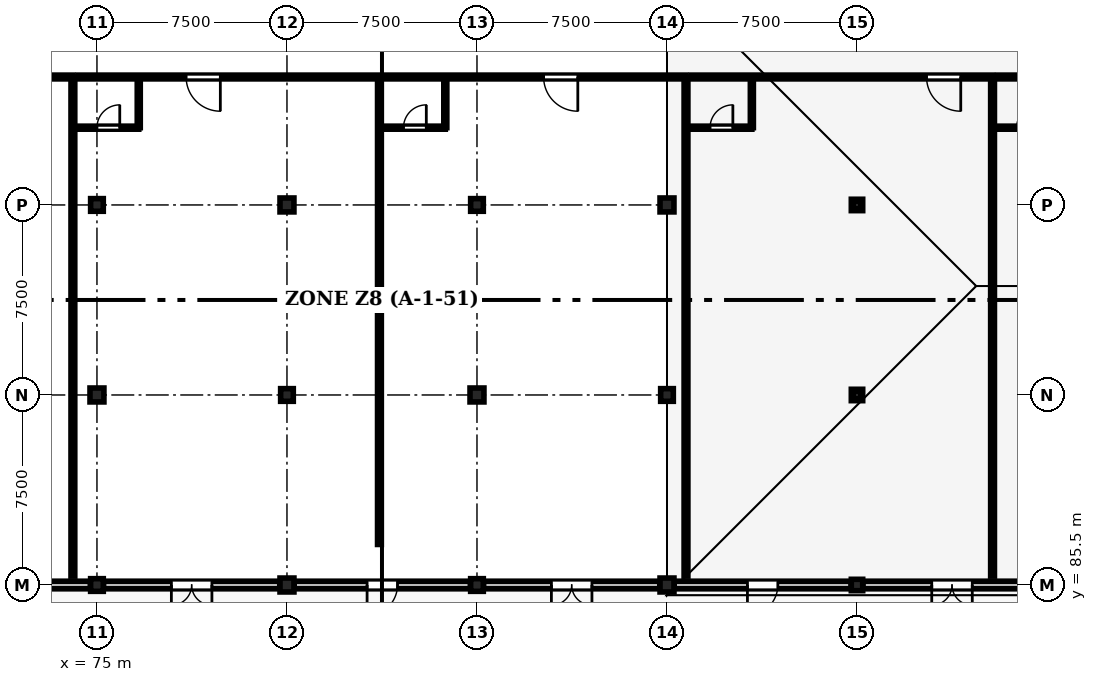
"""IFC4 building model, lengths in metres.
Left out: names, types, materials, properties, quantities, classifications, styles, units other than length and angle.
Written with IfcOpenShell. Run it as: python <this file> out.ifc"""

import sys

from ifc_helpers import new_model, si_unit, direction, frame, frame_2d, origin, origin_2d, place, context, subcontext, project, spatial, rectangle, i_section, extrude, element, fill, save


model = new_model("IFC4")
c1 = context("Model", 3, precision=1e-05, world=origin(), true_north=direction((0.0, 1.0)))
c2 = subcontext(c1, "Body", "Model", "MODEL_VIEW")
j1 = project(units=[si_unit("LENGTHUNIT", "METRE"), si_unit("PLANEANGLEUNIT", "RADIAN")], contexts=[c1])
p1 = place(None, origin())
s1 = spatial("IfcSite", under=j1, at=p1, CompositionType="ELEMENT")
p2 = place(p1, origin())
s2 = spatial("IfcBuilding", under=s1, at=p2, CompositionType="ELEMENT")
p3 = place(p2, frame((0.0, 0.0, 17.85)))
s3 = spatial("IfcBuildingStorey", under=s2, at=p3, CompositionType="ELEMENT", Elevation=17.85)
p4 = place(p3, frame((75.0, 85.5, 0.0), z_axis=(0.0, 0.0, 1.0), x_axis=(1.0, 0.0, 0.0)))
e1 = element("IfcColumn", 1, at=p4, inside=s3, PredefinedType="COLUMN", context=c2, shape_type="SweptSolid", body=[
    extrude(rectangle(XDim=0.5, YDim=0.5, at=origin_2d()), origin(), (0.0, 0.0, 1.0), 4.05),
])
p5 = place(p3, frame((75.0, 93.0, 0.0), z_axis=(0.0, 0.0, 1.0), x_axis=(1.0, 0.0, 0.0)))
e2 = element("IfcColumn", 2, at=p5, inside=s3, PredefinedType="COLUMN", context=c2, shape_type="SweptSolid", body=[
    extrude(rectangle(XDim=0.55, YDim=0.55, at=origin_2d()), origin(), (0.0, 0.0, 1.0), 4.05),
])
p6 = place(p3, frame((75.0, 100.5, 0.0), z_axis=(0.0, 0.0, 1.0), x_axis=(1.0, 0.0, 0.0)))
e3 = element("IfcColumn", 3, at=p6, inside=s3, PredefinedType="COLUMN", context=c2, shape_type="SweptSolid", body=[
    extrude(rectangle(XDim=0.5, YDim=0.5, at=origin_2d()), origin(), (0.0, 0.0, 1.0), 4.05),
])
p7 = place(p3, frame((82.5, 85.5, 0.0), z_axis=(0.0, 0.0, 1.0), x_axis=(1.0, 0.0, 0.0)))
e4 = element("IfcColumn", 4, at=p7, inside=s3, PredefinedType="COLUMN", context=c2, shape_type="SweptSolid", body=[
    extrude(rectangle(XDim=0.55, YDim=0.55, at=origin_2d()), origin(), (0.0, 0.0, 1.0), 4.05),
])
p8 = place(p3, frame((82.5, 93.0, 0.0), z_axis=(0.0, 0.0, 1.0), x_axis=(1.0, 0.0, 0.0)))
e5 = element("IfcColumn", 5, at=p8, inside=s3, PredefinedType="COLUMN", context=c2, shape_type="SweptSolid", body=[
    extrude(rectangle(XDim=0.5, YDim=0.5, at=origin_2d()), origin(), (0.0, 0.0, 1.0), 4.05),
])
p9 = place(p3, frame((82.5, 100.5, 0.0), z_axis=(0.0, 0.0, 1.0), x_axis=(1.0, 0.0, 0.0)))
e6 = element("IfcColumn", 6, at=p9, inside=s3, PredefinedType="COLUMN", context=c2, shape_type="SweptSolid", body=[
    extrude(rectangle(XDim=0.55, YDim=0.55, at=origin_2d()), origin(), (0.0, 0.0, 1.0), 4.05),
])
p10 = place(p3, frame((90.0, 85.5, 0.0), z_axis=(0.0, 0.0, 1.0), x_axis=(1.0, 0.0, 0.0)))
e7 = element("IfcColumn", 7, at=p10, inside=s3, PredefinedType="COLUMN", context=c2, shape_type="SweptSolid", body=[
    extrude(rectangle(XDim=0.5, YDim=0.5, at=origin_2d()), origin(), (0.0, 0.0, 1.0), 4.05),
])
p11 = place(p3, frame((90.0, 93.0, 0.0), z_axis=(0.0, 0.0, 1.0), x_axis=(1.0, 0.0, 0.0)))
e8 = element("IfcColumn", 8, at=p11, inside=s3, PredefinedType="COLUMN", context=c2, shape_type="SweptSolid", body=[
    extrude(rectangle(XDim=0.55, YDim=0.55, at=origin_2d()), origin(), (0.0, 0.0, 1.0), 4.05),
])
p12 = place(p3, frame((90.0, 100.5, 0.0), z_axis=(0.0, 0.0, 1.0), x_axis=(1.0, 0.0, 0.0)))
e9 = element("IfcColumn", 9, at=p12, inside=s3, PredefinedType="COLUMN", context=c2, shape_type="SweptSolid", body=[
    extrude(rectangle(XDim=0.5, YDim=0.5, at=origin_2d()), origin(), (0.0, 0.0, 1.0), 4.05),
])
p13 = place(p3, frame((97.5, 85.5, 0.0), z_axis=(0.0, 0.0, 1.0), x_axis=(1.0, 0.0, 0.0)))
e10 = element("IfcColumn", 10, at=p13, inside=s3, PredefinedType="COLUMN", context=c2, shape_type="SweptSolid", body=[
    extrude(rectangle(XDim=0.55, YDim=0.55, at=origin_2d()), origin(), (0.0, 0.0, 1.0), 4.05),
])
p14 = place(p3, frame((97.5, 93.0, 0.0), z_axis=(0.0, 0.0, 1.0), x_axis=(1.0, 0.0, 0.0)))
e11 = element("IfcColumn", 11, at=p14, inside=s3, PredefinedType="COLUMN", context=c2, shape_type="SweptSolid", body=[
    extrude(rectangle(XDim=0.5, YDim=0.5, at=origin_2d()), origin(), (0.0, 0.0, 1.0), 4.05),
])
p15 = place(p3, frame((97.5, 100.5, 0.0), z_axis=(0.0, 0.0, 1.0), x_axis=(1.0, 0.0, 0.0)))
e12 = element("IfcColumn", 12, at=p15, inside=s3, PredefinedType="COLUMN", context=c2, shape_type="SweptSolid", body=[
    extrude(rectangle(XDim=0.55, YDim=0.55, at=origin_2d()), origin(), (0.0, 0.0, 1.0), 4.05),
])
for number, where, z_axis, x_axis in (
    (13, (105.0, 85.5, 0.0), (0.0, 0.0, 1.0), (1.0, 0.0, 0.0)),
    (14, (105.0, 93.0, 0.0), (0.0, 0.0, 1.0), (1.0, 0.0, 0.0)),
    (15, (105.0, 100.5, 0.0), (0.0, 0.0, 1.0), (1.0, 0.0, 0.0)),
):
    element("IfcColumn", number, at=place(p3, frame(where, z_axis=z_axis, x_axis=x_axis)), inside=s3, PredefinedType="COLUMN", context=c2, shape_type="SweptSolid", body=[
        extrude(rectangle(XDim=0.45, YDim=0.45, at=origin_2d()), origin(), (0.0, 0.0, 1.0), 4.05),
    ])
for number, where, z_axis, x_axis in (
    (16, (105.0, 93.0, 4.05), (0.0, 0.0, 1.0), (1.0, 0.0, 0.0)),
    (17, (105.0, 100.5, 4.05), (0.0, 0.0, 1.0), (1.0, 0.0, 0.0)),
):
    element("IfcColumn", number, at=place(p3, frame(where, z_axis=z_axis, x_axis=x_axis)), inside=s3, PredefinedType="COLUMN", context=c2, shape_type="SweptSolid", body=[
        extrude(i_section(OverallWidth=0.3, OverallDepth=0.3, WebThickness=0.011, FlangeThickness=0.019, FilletRadius=0.027, at=origin_2d()), origin(), (0.0, 0.0, 1.0), 1.872),
    ])
p16 = place(p3, frame((74.74, 85.5, 0.0), z_axis=(0.0, 0.0, 1.0), x_axis=(-1.0, 0.0, 0.0)))
e18 = element("IfcWall", 18, at=p16, inside=s3, PredefinedType="STANDARD", context=c2, shape_type="SweptSolid", body=[
    extrude(rectangle(XDim=6.955, YDim=0.3, at=frame_2d((3.478, 0.0))), origin(), (0.0, 0.0, 1.0), 3.03),
])
p17 = place(p16, frame((2.877, 0.0, 0.0)))
e19 = element("IfcOpeningElement", 19, at=p17, cuts=e18, PredefinedType="OPENING", context=c2, shape_type="SweptSolid", body=[
    extrude(rectangle(XDim=1.2, YDim=2.3, at=frame_2d((0.6, 1.15))), frame((0.0, 0.16, 0.0), z_axis=(0.0, -1.0, 0.0), x_axis=(1.0, 0.0, 0.0)), (0.0, 0.0, 1.0), 0.32),
])
p18 = place(p3, frame((82.215, 85.5, 0.0), z_axis=(0.0, 0.0, 1.0), x_axis=(-1.0, 0.0, 0.0)))
e20 = element("IfcWall", 20, at=p18, inside=s3, PredefinedType="STANDARD", context=c2, shape_type="SweptSolid", body=[
    extrude(rectangle(XDim=6.955, YDim=0.3, at=frame_2d((3.478, 0.0))), origin(), (0.0, 0.0, 1.0), 3.03),
])
p19 = place(p18, frame((2.677, 0.0, 0.0)))
e21 = element("IfcOpeningElement", 21, at=p19, cuts=e20, PredefinedType="OPENING", context=c2, shape_type="SweptSolid", body=[
    extrude(rectangle(XDim=1.6, YDim=2.35, at=frame_2d((0.8, 1.175))), frame((0.0, 0.16, 0.0), z_axis=(0.0, -1.0, 0.0), x_axis=(1.0, 0.0, 0.0)), (0.0, 0.0, 1.0), 0.32),
])
p20 = place(p3, frame((89.74, 85.5, 0.0), z_axis=(0.0, 0.0, 1.0), x_axis=(-1.0, 0.0, 0.0)))
e22 = element("IfcWall", 22, at=p20, inside=s3, PredefinedType="STANDARD", context=c2, shape_type="SweptSolid", body=[
    extrude(rectangle(XDim=6.955, YDim=0.3, at=frame_2d((3.478, 0.0))), origin(), (0.0, 0.0, 1.0), 3.03),
])
p21 = place(p20, frame((2.877, 0.0, 0.0)))
e23 = element("IfcOpeningElement", 23, at=p21, cuts=e22, PredefinedType="OPENING", context=c2, shape_type="SweptSolid", body=[
    extrude(rectangle(XDim=1.2, YDim=2.3, at=frame_2d((0.6, 1.15))), frame((0.0, 0.16, 0.0), z_axis=(0.0, -1.0, 0.0), x_axis=(1.0, 0.0, 0.0)), (0.0, 0.0, 1.0), 0.32),
])
p22 = place(p3, frame((97.215, 85.5, 0.0), z_axis=(0.0, 0.0, 1.0), x_axis=(-1.0, 0.0, 0.0)))
e24 = element("IfcWall", 24, at=p22, inside=s3, PredefinedType="STANDARD", context=c2, shape_type="SweptSolid", body=[
    extrude(rectangle(XDim=6.955, YDim=0.3, at=frame_2d((3.478, 0.0))), origin(), (0.0, 0.0, 1.0), 3.03),
])
p23 = place(p22, frame((2.677, 0.0, 0.0)))
e25 = element("IfcOpeningElement", 25, at=p23, cuts=e24, PredefinedType="OPENING", context=c2, shape_type="SweptSolid", body=[
    extrude(rectangle(XDim=1.6, YDim=2.35, at=frame_2d((0.8, 1.175))), frame((0.0, 0.16, 0.0), z_axis=(0.0, -1.0, 0.0), x_axis=(1.0, 0.0, 0.0)), (0.0, 0.0, 1.0), 0.32),
])
p24 = place(p3, frame((104.765, 85.5, 0.0), z_axis=(0.0, 0.0, 1.0), x_axis=(-1.0, 0.0, 0.0)))
e26 = element("IfcWall", 26, at=p24, inside=s3, PredefinedType="STANDARD", context=c2, shape_type="SweptSolid", body=[
    extrude(rectangle(XDim=6.98, YDim=0.3, at=frame_2d((3.49, 0.0))), origin(), (0.0, 0.0, 1.0), 3.77),
])
p25 = place(p24, frame((2.89, 0.0, 0.0)))
e27 = element("IfcOpeningElement", 27, at=p25, cuts=e26, PredefinedType="OPENING", context=c2, shape_type="SweptSolid", body=[
    extrude(rectangle(XDim=1.2, YDim=2.3, at=frame_2d((0.6, 1.15))), frame((0.0, 0.16, 0.0), z_axis=(0.0, -1.0, 0.0), x_axis=(1.0, 0.0, 0.0)), (0.0, 0.0, 1.0), 0.32),
])
p26 = place(p3, frame((112.265, 85.5, 0.0), z_axis=(0.0, 0.0, 1.0), x_axis=(-1.0, 0.0, 0.0)))
e28 = element("IfcWall", 28, at=p26, inside=s3, PredefinedType="STANDARD", context=c2, shape_type="SweptSolid", body=[
    extrude(rectangle(XDim=7.03, YDim=0.3, at=frame_2d((3.515, 0.0))), origin(), (0.0, 0.0, 1.0), 3.77),
])
p27 = place(p26, frame((2.715, 0.0, 0.0)))
e29 = element("IfcOpeningElement", 29, at=p27, cuts=e28, PredefinedType="OPENING", context=c2, shape_type="SweptSolid", body=[
    extrude(rectangle(XDim=1.6, YDim=2.35, at=frame_2d((0.8, 1.175))), frame((0.0, 0.16, 0.0), z_axis=(0.0, -1.0, 0.0), x_axis=(1.0, 0.0, 0.0)), (0.0, 0.0, 1.0), 0.32),
])
p28 = place(p3, frame((74.05, 105.55, 0.0), z_axis=(0.0, 0.0, 1.0), x_axis=(-1.0, 0.0, 0.0)))
e30 = element("IfcWall", 30, at=p28, inside=s3, PredefinedType="PARTITIONING", context=c2, shape_type="SweptSolid", body=[
    extrude(rectangle(XDim=11.9, YDim=0.15, at=frame_2d((5.95, 0.0))), origin(), (0.0, 0.0, 1.0), 3.755),
])
p29 = place(p28, frame((2.26, 0.0, 0.0)))
e31 = element("IfcOpeningElement", 31, at=p29, cuts=e30, PredefinedType="OPENING", context=c2, shape_type="SweptSolid", body=[
    extrude(rectangle(XDim=1.35, YDim=2.25, at=frame_2d((0.675, 1.125))), frame((0.0, 0.085, 0.0), z_axis=(0.0, -1.0, 0.0), x_axis=(1.0, 0.0, 0.0)), (0.0, 0.0, 1.0), 0.17),
])
p30 = place(p3, frame((86.15, 105.55, 0.0), z_axis=(0.0, 0.0, 1.0), x_axis=(-1.0, 0.0, 0.0)))
e32 = element("IfcWall", 32, at=p30, inside=s3, PredefinedType="PARTITIONING", context=c2, shape_type="SweptSolid", body=[
    extrude(rectangle(XDim=11.9, YDim=0.15, at=frame_2d((5.95, 0.0))), origin(), (0.0, 0.0, 1.0), 3.755),
])
p31 = place(p30, frame((6.28, 0.0, 0.0)))
e33 = element("IfcOpeningElement", 33, at=p31, cuts=e32, PredefinedType="OPENING", context=c2, shape_type="SweptSolid", body=[
    extrude(rectangle(XDim=1.35, YDim=2.25, at=frame_2d((0.675, 1.125))), frame((0.0, 0.085, 0.0), z_axis=(0.0, -1.0, 0.0), x_axis=(1.0, 0.0, 0.0)), (0.0, 0.0, 1.0), 0.17),
])
p32 = place(p3, frame((74.25, 103.55, 0.0), z_axis=(0.0, 0.0, 1.0), x_axis=(1.0, 0.0, 0.0)))
e34 = element("IfcWall", 34, at=p32, inside=s3, PredefinedType="PARTITIONING", context=c2, shape_type="SweptSolid", body=[
    extrude(rectangle(XDim=2.4, YDim=0.12, at=frame_2d((1.2, 0.0))), origin(), (0.0, 0.0, 1.0), 3.755),
])
p33 = place(p32, frame((0.75, 0.0, 0.0)))
e35 = element("IfcOpeningElement", 35, at=p33, cuts=e34, PredefinedType="OPENING", context=c2, shape_type="SweptSolid", body=[
    extrude(rectangle(XDim=0.9, YDim=2.1, at=frame_2d((0.45, 1.05))), frame((0.0, 0.07, 0.0), z_axis=(0.0, -1.0, 0.0), x_axis=(1.0, 0.0, 0.0)), (0.0, 0.0, 1.0), 0.14),
])
p34 = place(p3, frame((76.65, 103.55, 0.0), z_axis=(0.0, 0.0, 1.0), x_axis=(0.0, 1.0, 0.0)))
e36 = element("IfcWall", 36, at=p34, inside=s3, PredefinedType="PARTITIONING", context=c2, shape_type="SweptSolid", body=[
    extrude(rectangle(XDim=2.0, YDim=0.12, at=frame_2d((1.0, 0.0))), origin(), (0.0, 0.0, 1.0), 3.755),
])
p35 = place(p3, frame((98.25, 105.55, 0.0), z_axis=(0.0, 0.0, 1.0), x_axis=(-1.0, 0.0, 0.0)))
e37 = element("IfcWall", 37, at=p35, inside=s3, PredefinedType="PARTITIONING", context=c2, shape_type="SweptSolid", body=[
    extrude(rectangle(XDim=11.9, YDim=0.15, at=frame_2d((5.95, 0.0))), origin(), (0.0, 0.0, 1.0), 3.755),
])
p36 = place(p35, frame((4.27, 0.0, 0.0)))
e38 = element("IfcOpeningElement", 38, at=p36, cuts=e37, PredefinedType="OPENING", context=c2, shape_type="SweptSolid", body=[
    extrude(rectangle(XDim=1.35, YDim=2.25, at=frame_2d((0.675, 1.125))), frame((0.0, 0.085, 0.0), z_axis=(0.0, -1.0, 0.0), x_axis=(1.0, 0.0, 0.0)), (0.0, 0.0, 1.0), 0.17),
])
p37 = place(p3, frame((86.35, 103.55, 0.0), z_axis=(0.0, 0.0, 1.0), x_axis=(1.0, 0.0, 0.0)))
e39 = element("IfcWall", 39, at=p37, inside=s3, PredefinedType="PARTITIONING", context=c2, shape_type="SweptSolid", body=[
    extrude(rectangle(XDim=2.4, YDim=0.12, at=frame_2d((1.2, 0.0))), origin(), (0.0, 0.0, 1.0), 3.755),
])
p38 = place(p37, frame((0.75, 0.0, 0.0)))
e40 = element("IfcOpeningElement", 40, at=p38, cuts=e39, PredefinedType="OPENING", context=c2, shape_type="SweptSolid", body=[
    extrude(rectangle(XDim=0.9, YDim=2.1, at=frame_2d((0.45, 1.05))), frame((0.0, 0.07, 0.0), z_axis=(0.0, -1.0, 0.0), x_axis=(1.0, 0.0, 0.0)), (0.0, 0.0, 1.0), 0.14),
])
p39 = place(p3, frame((88.75, 103.55, 0.0), z_axis=(0.0, 0.0, 1.0), x_axis=(0.0, 1.0, 0.0)))
e41 = element("IfcWall", 41, at=p39, inside=s3, PredefinedType="PARTITIONING", context=c2, shape_type="SweptSolid", body=[
    extrude(rectangle(XDim=2.0, YDim=0.12, at=frame_2d((1.0, 0.0))), origin(), (0.0, 0.0, 1.0), 3.755),
])
p40 = place(p3, frame((110.35, 105.55, 0.0), z_axis=(0.0, 0.0, 1.0), x_axis=(-1.0, 0.0, 0.0)))
e42 = element("IfcWall", 42, at=p40, inside=s3, PredefinedType="PARTITIONING", context=c2, shape_type="SweptSolid", body=[
    extrude(rectangle(XDim=11.9, YDim=0.15, at=frame_2d((5.95, 0.0))), origin(), (0.0, 0.0, 1.0), 3.755),
])
p41 = place(p40, frame((1.255, 0.0, 0.0)))
e43 = element("IfcOpeningElement", 43, at=p41, cuts=e42, PredefinedType="OPENING", context=c2, shape_type="SweptSolid", body=[
    extrude(rectangle(XDim=1.35, YDim=2.25, at=frame_2d((0.675, 1.125))), frame((0.0, 0.085, 0.0), z_axis=(0.0, -1.0, 0.0), x_axis=(1.0, 0.0, 0.0)), (0.0, 0.0, 1.0), 0.17),
])
p42 = place(p3, frame((98.45, 103.55, 0.0), z_axis=(0.0, 0.0, 1.0), x_axis=(1.0, 0.0, 0.0)))
e44 = element("IfcWall", 44, at=p42, inside=s3, PredefinedType="PARTITIONING", context=c2, shape_type="SweptSolid", body=[
    extrude(rectangle(XDim=2.4, YDim=0.12, at=frame_2d((1.2, 0.0))), origin(), (0.0, 0.0, 1.0), 3.755),
])
p43 = place(p42, frame((0.75, 0.0, 0.0)))
e45 = element("IfcOpeningElement", 45, at=p43, cuts=e44, PredefinedType="OPENING", context=c2, shape_type="SweptSolid", body=[
    extrude(rectangle(XDim=0.9, YDim=2.1, at=frame_2d((0.45, 1.05))), frame((0.0, 0.07, 0.0), z_axis=(0.0, -1.0, 0.0), x_axis=(1.0, 0.0, 0.0)), (0.0, 0.0, 1.0), 0.14),
])
p44 = place(p3, frame((100.85, 103.55, 0.0), z_axis=(0.0, 0.0, 1.0), x_axis=(0.0, 1.0, 0.0)))
e46 = element("IfcWall", 46, at=p44, inside=s3, PredefinedType="PARTITIONING", context=c2, shape_type="SweptSolid", body=[
    extrude(rectangle(XDim=2.0, YDim=0.12, at=frame_2d((1.0, 0.0))), origin(), (0.0, 0.0, 1.0), 3.755),
])
p45 = place(p3, frame((122.45, 105.55, 0.0), z_axis=(0.0, 0.0, 1.0), x_axis=(-1.0, 0.0, 0.0)))
e47 = element("IfcWall", 47, at=p45, inside=s3, PredefinedType="PARTITIONING", context=c2, shape_type="SweptSolid", body=[
    extrude(rectangle(XDim=11.9, YDim=0.15, at=frame_2d((5.95, 0.0))), origin(), (0.0, 0.0, 1.0), 3.755),
])
p46 = place(p45, frame((5.275, 0.0, 0.0)))
e48 = element("IfcOpeningElement", 48, at=p46, cuts=e47, PredefinedType="OPENING", context=c2, shape_type="SweptSolid", body=[
    extrude(rectangle(XDim=1.35, YDim=2.25, at=frame_2d((0.675, 1.125))), frame((0.0, 0.085, 0.0), z_axis=(0.0, -1.0, 0.0), x_axis=(1.0, 0.0, 0.0)), (0.0, 0.0, 1.0), 0.17),
])
p47 = place(p3, frame((110.55, 103.55, 0.0), z_axis=(0.0, 0.0, 1.0), x_axis=(1.0, 0.0, 0.0)))
e49 = element("IfcWall", 49, at=p47, inside=s3, PredefinedType="PARTITIONING", context=c2, shape_type="SweptSolid", body=[
    extrude(rectangle(XDim=2.4, YDim=0.12, at=frame_2d((1.2, 0.0))), origin(), (0.0, 0.0, 1.0), 3.755),
])
p48 = place(p47, frame((0.75, 0.0, 0.0)))
e50 = element("IfcOpeningElement", 50, at=p48, cuts=e49, PredefinedType="OPENING", context=c2, shape_type="SweptSolid", body=[
    extrude(rectangle(XDim=0.9, YDim=2.1, at=frame_2d((0.45, 1.05))), frame((0.0, 0.07, 0.0), z_axis=(0.0, -1.0, 0.0), x_axis=(1.0, 0.0, 0.0)), (0.0, 0.0, 1.0), 0.14),
])
p49 = place(p3, frame((74.05, 85.85, 0.0), z_axis=(0.0, 0.0, 1.0), x_axis=(0.0, 1.0, 0.0)))
e51 = element("IfcWall", 51, at=p49, inside=s3, PredefinedType="PARTITIONING", context=c2, shape_type="SweptSolid", body=[
    extrude(rectangle(XDim=19.7, YDim=0.15, at=frame_2d((9.85, 0.0))), origin(), (0.0, 0.0, 1.0), 3.755),
])
p50 = place(p3, frame((86.15, 87.1, 0.0), z_axis=(0.0, 0.0, 1.0), x_axis=(0.0, 1.0, 0.0)))
e52 = element("IfcWall", 52, at=p50, inside=s3, PredefinedType="PARTITIONING", context=c2, shape_type="SweptSolid", body=[
    extrude(rectangle(XDim=18.45, YDim=0.15, at=frame_2d((9.225, 0.0))), origin(), (0.0, 0.0, 1.0), 3.215),
])
for number, where, z_axis, x_axis in (
    (53, (98.25, 85.85, 0.0), (0.0, 0.0, 1.0), (0.0, 1.0, 0.0)),
    (54, (110.35, 85.85, 0.0), (0.0, 0.0, 1.0), (0.0, 1.0, 0.0)),
):
    element("IfcWall", number, at=place(p3, frame(where, z_axis=z_axis, x_axis=x_axis)), inside=s3, PredefinedType="PARTITIONING", context=c2, shape_type="SweptSolid", body=[
        extrude(rectangle(XDim=19.7, YDim=0.15, at=frame_2d((9.85, 0.0))), origin(), (0.0, 0.0, 1.0), 3.755),
    ])
p51 = place(p19, origin())
e55 = element("IfcDoor", 55, at=p51, inside=s3, OperationType="DOUBLE_DOOR_SINGLE_SWING", PredefinedType="DOOR", context=c2, shape_type="SweptSolid", body=[
    extrude(rectangle(XDim=1.6, YDim=2.35, at=frame_2d((0.8, 1.175))), frame((0.0, 0.025, 0.0), z_axis=(0.0, -1.0, 0.0), x_axis=(1.0, 0.0, 0.0)), (0.0, 0.0, 1.0), 0.05),
])
fill(e21, e55)
p52 = place(p21, origin())
e56 = element("IfcDoor", 56, at=p52, inside=s3, OperationType="SINGLE_SWING_RIGHT", PredefinedType="DOOR", context=c2, shape_type="SweptSolid", body=[
    extrude(rectangle(XDim=1.2, YDim=2.3, at=frame_2d((0.6, 1.15))), frame((0.0, 0.025, 0.0), z_axis=(0.0, -1.0, 0.0), x_axis=(1.0, 0.0, 0.0)), (0.0, 0.0, 1.0), 0.05),
])
fill(e23, e56)
p53 = place(p23, origin())
e57 = element("IfcDoor", 57, at=p53, inside=s3, OperationType="DOUBLE_DOOR_SINGLE_SWING", PredefinedType="DOOR", context=c2, shape_type="SweptSolid", body=[
    extrude(rectangle(XDim=1.6, YDim=2.35, at=frame_2d((0.8, 1.175))), frame((0.0, 0.025, 0.0), z_axis=(0.0, -1.0, 0.0), x_axis=(1.0, 0.0, 0.0)), (0.0, 0.0, 1.0), 0.05),
])
fill(e25, e57)
p54 = place(p25, origin())
e58 = element("IfcDoor", 58, at=p54, inside=s3, OperationType="SINGLE_SWING_RIGHT", PredefinedType="DOOR", context=c2, shape_type="SweptSolid", body=[
    extrude(rectangle(XDim=1.2, YDim=2.3, at=frame_2d((0.6, 1.15))), frame((0.0, 0.025, 0.0), z_axis=(0.0, -1.0, 0.0), x_axis=(1.0, 0.0, 0.0)), (0.0, 0.0, 1.0), 0.05),
])
fill(e27, e58)
p55 = place(p27, origin())
e59 = element("IfcDoor", 59, at=p55, inside=s3, OperationType="DOUBLE_DOOR_SINGLE_SWING", PredefinedType="DOOR", context=c2, shape_type="SweptSolid", body=[
    extrude(rectangle(XDim=1.6, YDim=2.35, at=frame_2d((0.8, 1.175))), frame((0.0, 0.025, 0.0), z_axis=(0.0, -1.0, 0.0), x_axis=(1.0, 0.0, 0.0)), (0.0, 0.0, 1.0), 0.05),
])
fill(e29, e59)
p56 = place(p31, origin())
e60 = element("IfcDoor", 60, at=p56, inside=s3, OperationType="SINGLE_SWING_LEFT", PredefinedType="DOOR", context=c2, shape_type="SweptSolid", body=[
    extrude(rectangle(XDim=1.35, YDim=2.25, at=frame_2d((0.675, 1.125))), frame((0.0, 0.025, 0.0), z_axis=(0.0, -1.0, 0.0), x_axis=(1.0, 0.0, 0.0)), (0.0, 0.0, 1.0), 0.05),
])
fill(e33, e60)
p57 = place(p33, origin())
e61 = element("IfcDoor", 61, at=p57, inside=s3, OperationType="SINGLE_SWING_RIGHT", PredefinedType="DOOR", context=c2, shape_type="SweptSolid", body=[
    extrude(rectangle(XDim=0.9, YDim=2.1, at=frame_2d((0.45, 1.05))), frame((0.0, 0.025, 0.0), z_axis=(0.0, -1.0, 0.0), x_axis=(1.0, 0.0, 0.0)), (0.0, 0.0, 1.0), 0.05),
])
fill(e35, e61)
p58 = place(p36, origin())
e62 = element("IfcDoor", 62, at=p58, inside=s3, OperationType="SINGLE_SWING_LEFT", PredefinedType="DOOR", context=c2, shape_type="SweptSolid", body=[
    extrude(rectangle(XDim=1.35, YDim=2.25, at=frame_2d((0.675, 1.125))), frame((0.0, 0.025, 0.0), z_axis=(0.0, -1.0, 0.0), x_axis=(1.0, 0.0, 0.0)), (0.0, 0.0, 1.0), 0.05),
])
fill(e38, e62)
p59 = place(p38, origin())
e63 = element("IfcDoor", 63, at=p59, inside=s3, OperationType="SINGLE_SWING_RIGHT", PredefinedType="DOOR", context=c2, shape_type="SweptSolid", body=[
    extrude(rectangle(XDim=0.9, YDim=2.1, at=frame_2d((0.45, 1.05))), frame((0.0, 0.025, 0.0), z_axis=(0.0, -1.0, 0.0), x_axis=(1.0, 0.0, 0.0)), (0.0, 0.0, 1.0), 0.05),
])
fill(e40, e63)
p60 = place(p41, origin())
e64 = element("IfcDoor", 64, at=p60, inside=s3, OperationType="SINGLE_SWING_LEFT", PredefinedType="DOOR", context=c2, shape_type="SweptSolid", body=[
    extrude(rectangle(XDim=1.35, YDim=2.25, at=frame_2d((0.675, 1.125))), frame((0.0, 0.025, 0.0), z_axis=(0.0, -1.0, 0.0), x_axis=(1.0, 0.0, 0.0)), (0.0, 0.0, 1.0), 0.05),
])
fill(e43, e64)
p61 = place(p43, origin())
e65 = element("IfcDoor", 65, at=p61, inside=s3, OperationType="SINGLE_SWING_RIGHT", PredefinedType="DOOR", context=c2, shape_type="SweptSolid", body=[
    extrude(rectangle(XDim=0.9, YDim=2.1, at=frame_2d((0.45, 1.05))), frame((0.0, 0.025, 0.0), z_axis=(0.0, -1.0, 0.0), x_axis=(1.0, 0.0, 0.0)), (0.0, 0.0, 1.0), 0.05),
])
fill(e45, e65)
p62 = place(p48, origin())
e66 = element("IfcDoor", 66, at=p62, inside=s3, OperationType="SINGLE_SWING_RIGHT", PredefinedType="DOOR", context=c2, shape_type="SweptSolid", body=[
    extrude(rectangle(XDim=0.9, YDim=2.1, at=frame_2d((0.45, 1.05))), frame((0.0, 0.025, 0.0), z_axis=(0.0, -1.0, 0.0), x_axis=(1.0, 0.0, 0.0)), (0.0, 0.0, 1.0), 0.05),
])
fill(e50, e66)
save(model, sys.argv[1])
